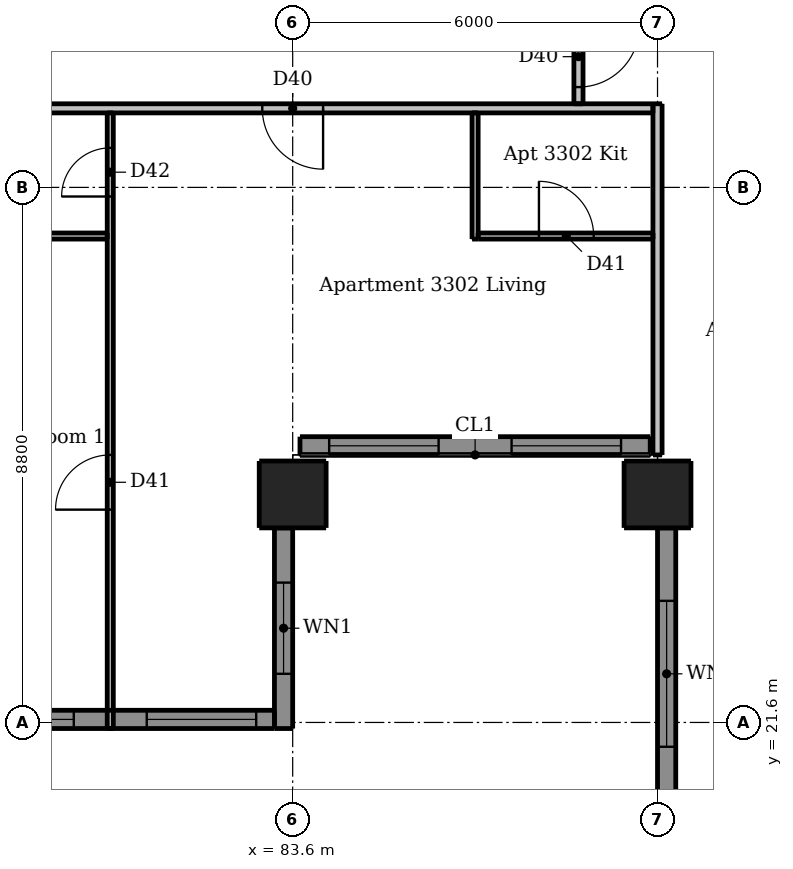
"""IFC4 building model, lengths in metres.
Left out: names, types, materials, properties, quantities, classifications, styles, units other than length and angle.
Written with IfcOpenShell. Run it as: python <this file> out.ifc"""

import sys

from ifc_helpers import new_model, si_unit, direction, frame, frame_2d, origin, origin_2d, place, context, subcontext, project, spatial, rectangle, extrude, element, fill, save


model = new_model("IFC4")
c1 = context("Model", 3, precision=1e-05, world=origin(), true_north=direction((0.0, 1.0)))
c2 = subcontext(c1, "Body", "Model", "MODEL_VIEW")
j1 = project(units=[si_unit("LENGTHUNIT", "METRE"), si_unit("PLANEANGLEUNIT", "RADIAN")], contexts=[c1])
p1 = place(None, origin())
s1 = spatial("IfcSite", under=j1, at=p1, CompositionType="ELEMENT")
p2 = place(p1, origin())
s2 = spatial("IfcBuilding", under=s1, at=p2, CompositionType="ELEMENT")
p3 = place(p2, frame((0.0, 0.0, 121.6)))
s3 = spatial("IfcBuildingStorey", under=s2, at=p3, CompositionType="ELEMENT", Elevation=121.6)
for number, where, z_axis, x_axis in (
    (1, (83.6, 25.35, 0.0), (0.0, 0.0, 1.0), (1.0, 0.0, 0.0)),
    (2, (89.6, 25.35, 0.0), (0.0, 0.0, 1.0), (1.0, 0.0, 0.0)),
):
    element("IfcColumn", number, at=place(p3, frame(where, z_axis=z_axis, x_axis=x_axis)), inside=s3, PredefinedType="COLUMN", context=c2, shape_type="SweptSolid", body=[
        extrude(rectangle(XDim=1.1, YDim=1.1, at=origin_2d()), origin(), (0.0, 0.0, 1.0), 2.95),
    ])
p4 = place(p3, frame((83.45, 21.5, 0.0), z_axis=(0.0, 0.0, 1.0), x_axis=(0.0, 1.0, 0.0)))
e3 = element("IfcWall", 3, at=p4, inside=s3, PredefinedType="SOLIDWALL", context=c2, shape_type="SweptSolid", body=[
    extrude(rectangle(XDim=3.3, YDim=0.3, at=frame_2d((1.65, 0.0))), origin(), (0.0, 0.0, 1.0), 2.95),
])
p5 = place(p4, frame((0.9, 0.0, 0.9)))
e4 = element("IfcOpeningElement", 4, at=p5, cuts=e3, PredefinedType="OPENING", context=c2, shape_type="SweptSolid", body=[
    extrude(rectangle(XDim=1.5, YDim=1.5, at=frame_2d((0.75, 0.75))), frame((0.0, 0.16, 0.0), z_axis=(0.0, -1.0, 0.0), x_axis=(1.0, 0.0, 0.0)), (0.0, 0.0, 1.0), 0.32),
])
p6 = place(p3, frame((89.75, 24.8, 0.0), z_axis=(0.0, 0.0, 1.0), x_axis=(0.0, -1.0, 0.0)))
e5 = element("IfcWall", 5, at=p6, inside=s3, PredefinedType="SOLIDWALL", context=c2, shape_type="SweptSolid", body=[
    extrude(rectangle(XDim=4.8, YDim=0.3, at=frame_2d((2.4, 0.0))), origin(), (0.0, 0.0, 1.0), 2.95),
])
p7 = place(p6, frame((1.2, 0.0, 0.15)))
e6 = element("IfcOpeningElement", 6, at=p7, cuts=e5, PredefinedType="OPENING", context=c2, shape_type="SweptSolid", body=[
    extrude(rectangle(XDim=2.4, YDim=2.1, at=frame_2d((1.2, 1.05))), frame((0.0, 0.16, 0.0), z_axis=(0.0, -1.0, 0.0), x_axis=(1.0, 0.0, 0.0)), (0.0, 0.0, 1.0), 0.32),
])
p8 = place(p3, frame((77.9, 21.65, 0.0), z_axis=(0.0, 0.0, 1.0), x_axis=(1.0, 0.0, 0.0)))
e7 = element("IfcWall", 7, at=p8, inside=s3, PredefinedType="SOLIDWALL", context=c2, shape_type="SweptSolid", body=[
    extrude(rectangle(XDim=5.4, YDim=0.3, at=frame_2d((2.7, 0.0))), origin(), (0.0, 0.0, 1.0), 2.34),
])
p9 = place(p8, frame((0.3, 0.0, 0.15)))
e8 = element("IfcOpeningElement", 8, at=p9, cuts=e7, PredefinedType="OPENING", context=c2, shape_type="SweptSolid", body=[
    extrude(rectangle(XDim=1.8, YDim=2.1, at=frame_2d((0.9, 1.05))), frame((0.0, 0.16, 0.0), z_axis=(0.0, -1.0, 0.0), x_axis=(1.0, 0.0, 0.0)), (0.0, 0.0, 1.0), 0.32),
])
p10 = place(p8, frame((3.3, 0.0, 0.15)))
e9 = element("IfcOpeningElement", 9, at=p10, cuts=e7, PredefinedType="OPENING", context=c2, shape_type="SweptSolid", body=[
    extrude(rectangle(XDim=1.8, YDim=2.1, at=frame_2d((0.9, 1.05))), frame((0.0, 0.16, 0.0), z_axis=(0.0, -1.0, 0.0), x_axis=(1.0, 0.0, 0.0)), (0.0, 0.0, 1.0), 0.32),
])
p11 = place(p3, frame((83.72, 26.15, 0.0), z_axis=(0.0, 0.0, 1.0), x_axis=(1.0, 0.0, 0.0)))
e10 = element("IfcWall", 10, at=p11, inside=s3, PredefinedType="SOLIDWALL", context=c2, shape_type="SweptSolid", body=[
    extrude(rectangle(XDim=5.76, YDim=0.3, at=frame_2d((2.88, 0.0))), origin(), (0.0, 0.0, 1.0), 2.95),
])
p12 = place(p11, frame((0.48, 0.0, 0.15)))
e11 = element("IfcOpeningElement", 11, at=p12, cuts=e10, PredefinedType="OPENING", context=c2, shape_type="SweptSolid", body=[
    extrude(rectangle(XDim=1.8, YDim=2.1, at=frame_2d((0.9, 1.05))), frame((0.0, 0.16, 0.0), z_axis=(0.0, -1.0, 0.0), x_axis=(1.0, 0.0, 0.0)), (0.0, 0.0, 1.0), 0.32),
])
p13 = place(p11, frame((3.48, 0.0, 0.15)))
e12 = element("IfcOpeningElement", 12, at=p13, cuts=e10, PredefinedType="OPENING", context=c2, shape_type="SweptSolid", body=[
    extrude(rectangle(XDim=1.8, YDim=2.1, at=frame_2d((0.9, 1.05))), frame((0.0, 0.16, 0.0), z_axis=(0.0, -1.0, 0.0), x_axis=(1.0, 0.0, 0.0)), (0.0, 0.0, 1.0), 0.32),
])
p14 = place(p3, frame((80.6, 21.5, 0.0), z_axis=(0.0, 0.0, 1.0), x_axis=(0.0, 1.0, 0.0)))
e13 = element("IfcWall", 13, at=p14, inside=s3, PredefinedType="PARTITIONING", context=c2, shape_type="SweptSolid", body=[
    extrude(rectangle(XDim=10.125, YDim=0.1, at=frame_2d((5.062, 0.0))), origin(), (0.0, 0.0, 1.0), 2.95),
])
p15 = place(p14, frame((3.6, 0.0, 0.0)))
e14 = element("IfcOpeningElement", 14, at=p15, cuts=e13, PredefinedType="OPENING", context=c2, shape_type="SweptSolid", body=[
    extrude(rectangle(XDim=0.9, YDim=2.1, at=frame_2d((0.45, 1.05))), frame((0.0, 0.06, 0.0), z_axis=(0.0, -1.0, 0.0), x_axis=(1.0, 0.0, 0.0)), (0.0, 0.0, 1.0), 0.12),
])
p16 = place(p14, frame((8.75, 0.0, 0.0)))
e15 = element("IfcOpeningElement", 15, at=p16, cuts=e13, PredefinedType="OPENING", context=c2, shape_type="SweptSolid", body=[
    extrude(rectangle(XDim=0.8, YDim=2.1, at=frame_2d((0.4, 1.05))), frame((0.0, 0.06, 0.0), z_axis=(0.0, -1.0, 0.0), x_axis=(1.0, 0.0, 0.0)), (0.0, 0.0, 1.0), 0.12),
])
p17 = place(p3, frame((86.6, 29.55, 0.0), z_axis=(0.0, 0.0, 1.0), x_axis=(0.0, 1.0, 0.0)))
e16 = element("IfcWall", 16, at=p17, inside=s3, PredefinedType="PARTITIONING", context=c2, shape_type="SweptSolid", body=[
    extrude(rectangle(XDim=2.075, YDim=0.1, at=frame_2d((1.038, 0.0))), origin(), (0.0, 0.0, 1.0), 2.95),
])
p18 = place(p3, frame((77.05, 29.6, 0.0), z_axis=(0.0, 0.0, 1.0), x_axis=(1.0, 0.0, 0.0)))
e17 = element("IfcWall", 17, at=p18, inside=s3, PredefinedType="PARTITIONING", context=c2, shape_type="SweptSolid", body=[
    extrude(rectangle(XDim=3.5, YDim=0.1, at=frame_2d((1.75, 0.0))), origin(), (0.0, 0.0, 1.0), 2.95),
])
p19 = place(p3, frame((86.65, 29.6, 0.0), z_axis=(0.0, 0.0, 1.0), x_axis=(1.0, 0.0, 0.0)))
e18 = element("IfcWall", 18, at=p19, inside=s3, PredefinedType="PARTITIONING", context=c2, shape_type="SweptSolid", body=[
    extrude(rectangle(XDim=2.875, YDim=0.1, at=frame_2d((1.438, 0.0))), origin(), (0.0, 0.0, 1.0), 2.95),
])
p20 = place(p19, frame((1.0, 0.0, 0.0)))
e19 = element("IfcOpeningElement", 19, at=p20, cuts=e18, PredefinedType="OPENING", context=c2, shape_type="SweptSolid", body=[
    extrude(rectangle(XDim=0.9, YDim=2.1, at=frame_2d((0.45, 1.05))), frame((0.0, 0.06, 0.0), z_axis=(0.0, -1.0, 0.0), x_axis=(1.0, 0.0, 0.0)), (0.0, 0.0, 1.0), 0.12),
])
p21 = place(p3, frame((88.3, 60.475, 0.0), z_axis=(0.0, 0.0, 1.0), x_axis=(0.0, -1.0, 0.0)))
e20 = element("IfcWall", 20, at=p21, inside=s3, PredefinedType="PARTITIONING", context=c2, shape_type="SweptSolid", body=[
    extrude(rectangle(XDim=28.7, YDim=0.15, at=frame_2d((14.35, 0.0))), origin(), (0.0, 0.0, 1.0), 2.95),
])
p22 = place(p21, frame((27.425, 0.0, 0.0)))
e21 = element("IfcOpeningElement", 21, at=p22, cuts=e20, PredefinedType="OPENING", context=c2, shape_type="SweptSolid", body=[
    extrude(rectangle(XDim=1.0, YDim=2.1, at=frame_2d((0.5, 1.05))), frame((0.0, 0.085, 0.0), z_axis=(0.0, -1.0, 0.0), x_axis=(1.0, 0.0, 0.0)), (0.0, 0.0, 1.0), 0.17),
])
p23 = place(p21, frame((13.075, 0.0, 0.0)))
e22 = element("IfcOpeningElement", 22, at=p23, cuts=e20, PredefinedType="OPENING", context=c2, shape_type="SweptSolid", body=[
    extrude(rectangle(XDim=1.0, YDim=2.1, at=frame_2d((0.5, 1.05))), frame((0.0, 0.085, 0.0), z_axis=(0.0, -1.0, 0.0), x_axis=(1.0, 0.0, 0.0)), (0.0, 0.0, 1.0), 0.17),
])
p24 = place(p21, frame((2.575, 0.0, 0.0)))
e23 = element("IfcOpeningElement", 23, at=p24, cuts=e20, PredefinedType="OPENING", context=c2, shape_type="SweptSolid", body=[
    extrude(rectangle(XDim=1.0, YDim=2.1, at=frame_2d((0.5, 1.05))), frame((0.0, 0.085, 0.0), z_axis=(0.0, -1.0, 0.0), x_axis=(1.0, 0.0, 0.0)), (0.0, 0.0, 1.0), 0.17),
])
p25 = place(p3, frame((89.6, 26.0, 0.0), z_axis=(0.0, 0.0, 1.0), x_axis=(0.0, 1.0, 0.0)))
e24 = element("IfcWall", 24, at=p25, inside=s3, PredefinedType="PARTITIONING", context=c2, shape_type="SweptSolid", body=[
    extrude(rectangle(XDim=5.775, YDim=0.15, at=frame_2d((2.887, 0.0))), origin(), (0.0, 0.0, 1.0), 2.332),
])
p26 = place(p3, frame((89.525, 31.7, 0.0), z_axis=(0.0, 0.0, 1.0), x_axis=(-1.0, 0.0, 0.0)))
e25 = element("IfcWall", 25, at=p26, inside=s3, PredefinedType="PARTITIONING", context=c2, shape_type="SweptSolid", body=[
    extrude(rectangle(XDim=28.75, YDim=0.15, at=frame_2d((14.375, 0.0))), origin(), (0.0, 0.0, 1.0), 2.95),
])
p27 = place(p26, frame((24.625, 0.0, 0.0)))
e26 = element("IfcOpeningElement", 26, at=p27, cuts=e25, PredefinedType="OPENING", context=c2, shape_type="SweptSolid", body=[
    extrude(rectangle(XDim=1.0, YDim=2.1, at=frame_2d((0.5, 1.05))), frame((0.0, 0.085, 0.0), z_axis=(0.0, -1.0, 0.0), x_axis=(1.0, 0.0, 0.0)), (0.0, 0.0, 1.0), 0.17),
])
p28 = place(p26, frame((5.425, 0.0, 0.0)))
e27 = element("IfcOpeningElement", 27, at=p28, cuts=e25, PredefinedType="OPENING", context=c2, shape_type="SweptSolid", body=[
    extrude(rectangle(XDim=1.0, YDim=2.1, at=frame_2d((0.5, 1.05))), frame((0.0, 0.085, 0.0), z_axis=(0.0, -1.0, 0.0), x_axis=(1.0, 0.0, 0.0)), (0.0, 0.0, 1.0), 0.17),
])
p29 = place(p5, origin())
e28 = element("IfcWindow", 28, at=p29, inside=s3, PartitioningType="DOUBLE_PANEL_VERTICAL", PredefinedType="WINDOW", context=c2, shape_type="SweptSolid", body=[
    extrude(rectangle(XDim=1.5, YDim=1.5, at=frame_2d((0.75, 0.75))), frame((0.0, 0.03, 0.0), z_axis=(0.0, -1.0, 0.0), x_axis=(1.0, 0.0, 0.0)), (0.0, 0.0, 1.0), 0.06),
])
fill(e4, e28)
p30 = place(p7, origin())
e29 = element("IfcWindow", 29, at=p30, inside=s3, PartitioningType="DOUBLE_PANEL_VERTICAL", PredefinedType="WINDOW", context=c2, shape_type="SweptSolid", body=[
    extrude(rectangle(XDim=2.4, YDim=2.1, at=frame_2d((1.2, 1.05))), frame((0.0, 0.03, 0.0), z_axis=(0.0, -1.0, 0.0), x_axis=(1.0, 0.0, 0.0)), (0.0, 0.0, 1.0), 0.06),
])
fill(e6, e29)
p31 = place(p9, origin())
e30 = element("IfcWindow", 30, at=p31, inside=s3, PartitioningType="DOUBLE_PANEL_VERTICAL", PredefinedType="WINDOW", context=c2, shape_type="SweptSolid", body=[
    extrude(rectangle(XDim=1.8, YDim=2.1, at=frame_2d((0.9, 1.05))), frame((0.0, 0.03, 0.0), z_axis=(0.0, -1.0, 0.0), x_axis=(1.0, 0.0, 0.0)), (0.0, 0.0, 1.0), 0.06),
])
fill(e8, e30)
p32 = place(p10, origin())
e31 = element("IfcWindow", 31, at=p32, inside=s3, PartitioningType="DOUBLE_PANEL_VERTICAL", PredefinedType="WINDOW", context=c2, shape_type="SweptSolid", body=[
    extrude(rectangle(XDim=1.8, YDim=2.1, at=frame_2d((0.9, 1.05))), frame((0.0, 0.03, 0.0), z_axis=(0.0, -1.0, 0.0), x_axis=(1.0, 0.0, 0.0)), (0.0, 0.0, 1.0), 0.06),
])
fill(e9, e31)
p33 = place(p12, origin())
e32 = element("IfcWindow", 32, at=p33, inside=s3, PartitioningType="DOUBLE_PANEL_VERTICAL", PredefinedType="WINDOW", context=c2, shape_type="SweptSolid", body=[
    extrude(rectangle(XDim=1.8, YDim=2.1, at=frame_2d((0.9, 1.05))), frame((0.0, 0.03, 0.0), z_axis=(0.0, -1.0, 0.0), x_axis=(1.0, 0.0, 0.0)), (0.0, 0.0, 1.0), 0.06),
])
fill(e11, e32)
p34 = place(p13, origin())
e33 = element("IfcWindow", 33, at=p34, inside=s3, PartitioningType="DOUBLE_PANEL_VERTICAL", PredefinedType="WINDOW", context=c2, shape_type="SweptSolid", body=[
    extrude(rectangle(XDim=1.8, YDim=2.1, at=frame_2d((0.9, 1.05))), frame((0.0, 0.03, 0.0), z_axis=(0.0, -1.0, 0.0), x_axis=(1.0, 0.0, 0.0)), (0.0, 0.0, 1.0), 0.06),
])
fill(e12, e33)
p35 = place(p28, origin())
e34 = element("IfcDoor", 34, at=p35, inside=s3, OperationType="SINGLE_SWING_LEFT", PredefinedType="DOOR", context=c2, shape_type="SweptSolid", body=[
    extrude(rectangle(XDim=1.0, YDim=2.1, at=frame_2d((0.5, 1.05))), frame((0.0, 0.025, 0.0), z_axis=(0.0, -1.0, 0.0), x_axis=(1.0, 0.0, 0.0)), (0.0, 0.0, 1.0), 0.05),
])
fill(e27, e34)
p36 = place(p20, origin())
e35 = element("IfcDoor", 35, at=p36, inside=s3, OperationType="SINGLE_SWING_LEFT", PredefinedType="DOOR", context=c2, shape_type="SweptSolid", body=[
    extrude(rectangle(XDim=0.9, YDim=2.1, at=frame_2d((0.45, 1.05))), frame((0.0, 0.025, 0.0), z_axis=(0.0, -1.0, 0.0), x_axis=(1.0, 0.0, 0.0)), (0.0, 0.0, 1.0), 0.05),
])
fill(e19, e35)
p37 = place(p15, origin())
e36 = element("IfcDoor", 36, at=p37, inside=s3, OperationType="SINGLE_SWING_LEFT", PredefinedType="DOOR", context=c2, shape_type="SweptSolid", body=[
    extrude(rectangle(XDim=0.9, YDim=2.1, at=frame_2d((0.45, 1.05))), frame((0.0, 0.025, 0.0), z_axis=(0.0, -1.0, 0.0), x_axis=(1.0, 0.0, 0.0)), (0.0, 0.0, 1.0), 0.05),
])
fill(e14, e36)
p38 = place(p16, origin())
e37 = element("IfcDoor", 37, at=p38, inside=s3, OperationType="SINGLE_SWING_LEFT", PredefinedType="DOOR", context=c2, shape_type="SweptSolid", body=[
    extrude(rectangle(XDim=0.8, YDim=2.1, at=frame_2d((0.4, 1.05))), frame((0.0, 0.025, 0.0), z_axis=(0.0, -1.0, 0.0), x_axis=(1.0, 0.0, 0.0)), (0.0, 0.0, 1.0), 0.05),
])
fill(e15, e37)
p39 = place(p22, origin())
e38 = element("IfcDoor", 38, at=p39, inside=s3, OperationType="SINGLE_SWING_LEFT", PredefinedType="DOOR", context=c2, shape_type="SweptSolid", body=[
    extrude(rectangle(XDim=1.0, YDim=2.1, at=frame_2d((0.5, 1.05))), frame((0.0, 0.025, 0.0), z_axis=(0.0, -1.0, 0.0), x_axis=(1.0, 0.0, 0.0)), (0.0, 0.0, 1.0), 0.05),
])
fill(e21, e38)
save(model, sys.argv[1])
